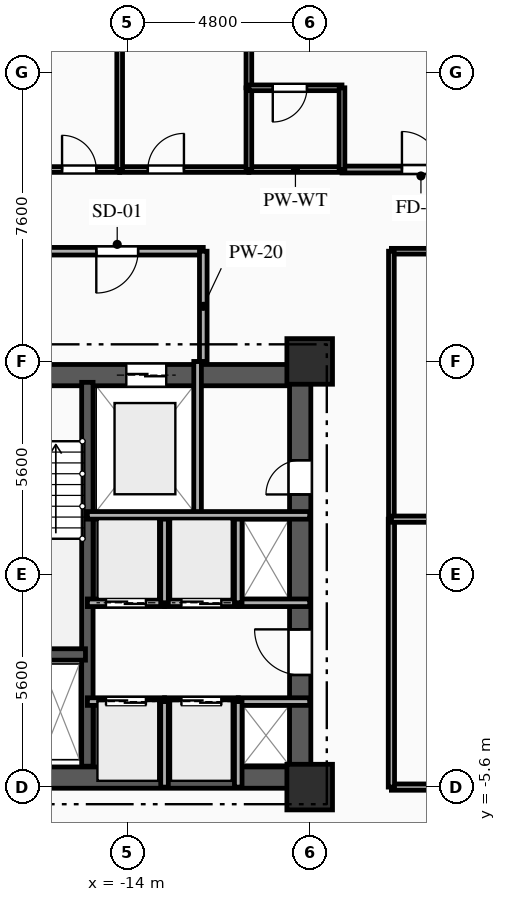
"""IFC4 building model, lengths in metres.
Left out: names, types, materials, properties, quantities, classifications, styles, units other than length and angle.
Written with IfcOpenShell. Run it as: python <this file> out.ifc"""

import sys

from ifc_helpers import new_model, si_unit, direction, frame, frame_2d, origin, origin_2d, place, context, subcontext, project, spatial, rectangle, extrude, element, fill, save


model = new_model("IFC4")
c1 = context("Model", 3, precision=1e-05, world=origin(), true_north=direction((0.0, 1.0)))
c2 = subcontext(c1, "Body", "Model", "MODEL_VIEW")
j1 = project(units=[si_unit("LENGTHUNIT", "METRE"), si_unit("PLANEANGLEUNIT", "RADIAN")], contexts=[c1])
p1 = place(None, origin())
s1 = spatial("IfcSite", under=j1, at=p1, CompositionType="ELEMENT")
p2 = place(p1, origin())
s2 = spatial("IfcBuilding", under=s1, at=p2, CompositionType="ELEMENT")
p3 = place(p2, frame((0.0, 0.0, 53.8)))
s3 = spatial("IfcBuildingStorey", under=s2, at=p3, CompositionType="ELEMENT", Elevation=53.8)
for number, where, z_axis, x_axis in (
    (1, (-9.2, -5.6, 0.0), (0.0, 0.0, 1.0), (1.0, 0.0, 0.0)),
    (2, (-9.2, 5.6, 0.0), (0.0, 0.0, 1.0), (1.0, 0.0, 0.0)),
):
    element("IfcColumn", number, at=place(p3, frame(where, z_axis=z_axis, x_axis=x_axis)), inside=s3, PredefinedType="COLUMN", context=c2, shape_type="SweptSolid", body=[
        extrude(rectangle(XDim=1.2, YDim=1.2, at=origin_2d()), origin(), (0.0, 0.0, 1.0), 3.35),
    ])
p4 = place(p3, frame((-18.8, 5.24, 0.0), z_axis=(0.0, 0.0, 1.0), x_axis=(1.0, 0.0, 0.0)))
e3 = element("IfcWall", 3, at=p4, inside=s3, PredefinedType="SHEAR", context=c2, shape_type="SweptSolid", body=[
    extrude(rectangle(XDim=9.6, YDim=0.56, at=frame_2d((4.8, 0.0))), origin(), (0.0, 0.0, 1.0), 3.035),
])
p5 = place(p4, frame((1.55, 0.0, 0.0)))
e4 = element("IfcOpeningElement", 4, at=p5, cuts=e3, PredefinedType="OPENING", context=c2, shape_type="SweptSolid", body=[
    extrude(rectangle(XDim=1.1, YDim=2.15, at=frame_2d((0.55, 1.075))), frame((0.0, 0.29, 0.0), z_axis=(0.0, -1.0, 0.0), x_axis=(1.0, 0.0, 0.0)), (0.0, 0.0, 1.0), 0.58),
])
p6 = place(p4, frame((4.775, 0.0, 0.0)))
e5 = element("IfcOpeningElement", 5, at=p6, cuts=e3, PredefinedType="OPENING", context=c2, shape_type="SweptSolid", body=[
    extrude(rectangle(XDim=1.05, YDim=2.1, at=frame_2d((0.525, 1.05))), frame((0.0, 0.29, 0.0), z_axis=(0.0, -1.0, 0.0), x_axis=(1.0, 0.0, 0.0)), (0.0, 0.0, 1.0), 0.58),
])
p7 = place(p3, frame((-18.8, -5.35, 0.0), z_axis=(0.0, 0.0, 1.0), x_axis=(1.0, 0.0, 0.0)))
e6 = element("IfcWall", 6, at=p7, inside=s3, PredefinedType="SHEAR", context=c2, shape_type="SweptSolid", body=[
    extrude(rectangle(XDim=9.6, YDim=0.56, at=frame_2d((4.8, 0.0))), origin(), (0.0, 0.0, 1.0), 3.035),
])
p8 = place(p7, frame((1.05, 0.0, 0.0)))
e7 = element("IfcOpeningElement", 7, at=p8, cuts=e6, PredefinedType="OPENING", context=c2, shape_type="SweptSolid", body=[
    extrude(rectangle(XDim=0.9, YDim=2.1, at=frame_2d((0.45, 1.05))), frame((0.0, 0.29, 0.0), z_axis=(0.0, -1.0, 0.0), x_axis=(1.0, 0.0, 0.0)), (0.0, 0.0, 1.0), 0.58),
])
p9 = place(p3, frame((-9.45, -5.05, 0.0), z_axis=(0.0, 0.0, 1.0), x_axis=(0.0, 1.0, 0.0)))
e8 = element("IfcWall", 8, at=p9, inside=s3, PredefinedType="SHEAR", context=c2, shape_type="SweptSolid", body=[
    extrude(rectangle(XDim=10.1, YDim=0.56, at=frame_2d((5.05, 0.0))), origin(), (0.0, 0.0, 1.0), 3.035),
])
p10 = place(p9, frame((7.15, 0.0, 0.0)))
e9 = element("IfcOpeningElement", 9, at=p10, cuts=e8, PredefinedType="OPENING", context=c2, shape_type="SweptSolid", body=[
    extrude(rectangle(XDim=0.9, YDim=2.1, at=frame_2d((0.45, 1.05))), frame((0.0, 0.29, 0.0), z_axis=(0.0, -1.0, 0.0), x_axis=(1.0, 0.0, 0.0)), (0.0, 0.0, 1.0), 0.58),
])
p11 = place(p9, frame((2.4, 0.0, 0.0)))
e10 = element("IfcOpeningElement", 10, at=p11, cuts=e8, PredefinedType="OPENING", context=c2, shape_type="SweptSolid", body=[
    extrude(rectangle(XDim=1.2, YDim=2.15, at=frame_2d((0.6, 1.075))), frame((0.0, 0.29, 0.0), z_axis=(0.0, -1.0, 0.0), x_axis=(1.0, 0.0, 0.0)), (0.0, 0.0, 1.0), 0.58),
])
p12 = place(p3, frame((-15.05, -5.05, 0.0), z_axis=(0.0, 0.0, 1.0), x_axis=(0.0, 1.0, 0.0)))
e11 = element("IfcWall", 11, at=p12, inside=s3, PredefinedType="SHEAR", context=c2, shape_type="SweptSolid", body=[
    extrude(rectangle(XDim=10.1, YDim=0.3, at=frame_2d((5.05, 0.0))), origin(), (0.0, 0.0, 1.0), 3.035),
])
p13 = place(p3, frame((-18.28, -2.11, 0.0), z_axis=(0.0, 0.0, 1.0), x_axis=(1.0, 0.0, 0.0)))
e12 = element("IfcWall", 12, at=p13, inside=s3, PredefinedType="SHEAR", context=c2, shape_type="SweptSolid", body=[
    extrude(rectangle(XDim=3.18, YDim=0.3, at=frame_2d((1.59, 0.0))), origin(), (0.0, 0.0, 1.0), 3.035),
])
p14 = place(p3, frame((-12.15, 1.55, 0.0), z_axis=(0.0, 0.0, 1.0), x_axis=(0.0, 1.0, 0.0)))
e13 = element("IfcWall", 13, at=p14, inside=s3, PredefinedType="PARTITIONING", context=c2, shape_type="SweptSolid", body=[
    extrude(rectangle(XDim=4.05, YDim=0.2, at=frame_2d((2.025, 0.0))), origin(), (0.0, 0.0, 1.0), 3.035),
])
p15 = place(p3, frame((-12.0, 8.5, 0.0), z_axis=(0.0, 0.0, 1.0), x_axis=(-1.0, 0.0, 0.0)))
e14 = element("IfcWall", 14, at=p15, inside=s3, PredefinedType="PARTITIONING", context=c2, shape_type="SweptSolid", body=[
    extrude(rectangle(XDim=6.8, YDim=0.2, at=frame_2d((3.4, 0.0))), origin(), (0.0, 0.0, 1.0), 3.035),
])
p16 = place(p15, frame((1.715, 0.0, 0.0)))
e15 = element("IfcOpeningElement", 15, at=p16, cuts=e14, PredefinedType="OPENING", context=c2, shape_type="SweptSolid", body=[
    extrude(rectangle(XDim=1.1, YDim=2.15, at=frame_2d((0.55, 1.075))), frame((0.0, 0.11, 0.0), z_axis=(0.0, -1.0, 0.0), x_axis=(1.0, 0.0, 0.0)), (0.0, 0.0, 1.0), 0.22),
])
p17 = place(p3, frame((-12.0, 5.6, 0.0), z_axis=(0.0, 0.0, 1.0), x_axis=(0.0, 1.0, 0.0)))
e16 = element("IfcWall", 16, at=p17, inside=s3, PredefinedType="PARTITIONING", context=c2, shape_type="SweptSolid", body=[
    extrude(rectangle(XDim=2.9, YDim=0.2, at=frame_2d((1.45, 0.0))), origin(), (0.0, 0.0, 1.0), 3.035),
])
p18 = place(p3, frame((-15.05, -3.35, 0.0), z_axis=(0.0, 0.0, 1.0), x_axis=(1.0, 0.0, 0.0)))
e17 = element("IfcWall", 17, at=p18, inside=s3, PredefinedType="PARTITIONING", context=c2, shape_type="SweptSolid", body=[
    extrude(rectangle(XDim=2.03, YDim=0.2, at=frame_2d((1.015, 0.0))), origin(), (0.0, 0.0, 1.0), 3.035),
])
p19 = place(p18, frame((0.49, 0.0, 0.0)))
e18 = element("IfcOpeningElement", 18, at=p19, cuts=e17, PredefinedType="OPENING", context=c2, shape_type="SweptSolid", body=[
    extrude(rectangle(XDim=1.05, YDim=2.1, at=frame_2d((0.525, 1.05))), frame((0.0, 0.11, 0.0), z_axis=(0.0, -1.0, 0.0), x_axis=(1.0, 0.0, 0.0)), (0.0, 0.0, 1.0), 0.22),
])
p20 = place(p3, frame((-13.02, -3.35, 0.0), z_axis=(0.0, 0.0, 1.0), x_axis=(1.0, 0.0, 0.0)))
e19 = element("IfcWall", 19, at=p20, inside=s3, PredefinedType="PARTITIONING", context=c2, shape_type="SweptSolid", body=[
    extrude(rectangle(XDim=1.94, YDim=0.2, at=frame_2d((0.97, 0.0))), origin(), (0.0, 0.0, 1.0), 3.035),
])
p21 = place(p20, frame((0.445, 0.0, 0.0)))
e20 = element("IfcOpeningElement", 20, at=p21, cuts=e19, PredefinedType="OPENING", context=c2, shape_type="SweptSolid", body=[
    extrude(rectangle(XDim=1.05, YDim=2.1, at=frame_2d((0.525, 1.05))), frame((0.0, 0.11, 0.0), z_axis=(0.0, -1.0, 0.0), x_axis=(1.0, 0.0, 0.0)), (0.0, 0.0, 1.0), 0.22),
])
p22 = place(p3, frame((-11.08, -3.35, 0.0), z_axis=(0.0, 0.0, 1.0), x_axis=(1.0, 0.0, 0.0)))
e21 = element("IfcWall", 21, at=p22, inside=s3, PredefinedType="PARTITIONING", context=c2, shape_type="SweptSolid", body=[
    extrude(rectangle(XDim=1.88, YDim=0.2, at=frame_2d((0.94, 0.0))), origin(), (0.0, 0.0, 1.0), 2.75),
])
p23 = place(p3, frame((-13.02, -0.75, 0.0), z_axis=(0.0, 0.0, 1.0), x_axis=(-1.0, 0.0, 0.0)))
e22 = element("IfcWall", 22, at=p23, inside=s3, PredefinedType="PARTITIONING", context=c2, shape_type="SweptSolid", body=[
    extrude(rectangle(XDim=2.03, YDim=0.2, at=frame_2d((1.015, 0.0))), origin(), (0.0, 0.0, 1.0), 3.035),
])
p24 = place(p23, frame((0.49, 0.0, 0.0)))
e23 = element("IfcOpeningElement", 23, at=p24, cuts=e22, PredefinedType="OPENING", context=c2, shape_type="SweptSolid", body=[
    extrude(rectangle(XDim=1.05, YDim=2.1, at=frame_2d((0.525, 1.05))), frame((0.0, 0.11, 0.0), z_axis=(0.0, -1.0, 0.0), x_axis=(1.0, 0.0, 0.0)), (0.0, 0.0, 1.0), 0.22),
])
p25 = place(p3, frame((-11.08, -0.75, 0.0), z_axis=(0.0, 0.0, 1.0), x_axis=(-1.0, 0.0, 0.0)))
e24 = element("IfcWall", 24, at=p25, inside=s3, PredefinedType="PARTITIONING", context=c2, shape_type="SweptSolid", body=[
    extrude(rectangle(XDim=1.94, YDim=0.2, at=frame_2d((0.97, 0.0))), origin(), (0.0, 0.0, 1.0), 3.035),
])
p26 = place(p25, frame((0.445, 0.0, 0.0)))
e25 = element("IfcOpeningElement", 25, at=p26, cuts=e24, PredefinedType="OPENING", context=c2, shape_type="SweptSolid", body=[
    extrude(rectangle(XDim=1.05, YDim=2.1, at=frame_2d((0.525, 1.05))), frame((0.0, 0.11, 0.0), z_axis=(0.0, -1.0, 0.0), x_axis=(1.0, 0.0, 0.0)), (0.0, 0.0, 1.0), 0.22),
])
p27 = place(p3, frame((-9.2, -0.75, 0.0), z_axis=(0.0, 0.0, 1.0), x_axis=(-1.0, 0.0, 0.0)))
e26 = element("IfcWall", 26, at=p27, inside=s3, PredefinedType="PARTITIONING", context=c2, shape_type="SweptSolid", body=[
    extrude(rectangle(XDim=1.88, YDim=0.2, at=frame_2d((0.94, 0.0))), origin(), (0.0, 0.0, 1.0), 3.035),
])
for number, where, z_axis, x_axis in (
    (27, (-13.02, -5.6, 0.0), (0.0, 0.0, 1.0), (0.0, 1.0, 0.0)),
    (28, (-11.08, -5.6, 0.0), (0.0, 0.0, 1.0), (0.0, 1.0, 0.0)),
):
    element("IfcWall", number, at=place(p3, frame(where, z_axis=z_axis, x_axis=x_axis)), inside=s3, PredefinedType="PARTITIONING", context=c2, shape_type="SweptSolid", body=[
        extrude(rectangle(XDim=2.25, YDim=0.2, at=frame_2d((1.125, 0.0))), origin(), (0.0, 0.0, 1.0), 3.035),
    ])
for number, where, z_axis, x_axis in (
    (29, (-13.02, -0.75, 0.0), (0.0, 0.0, 1.0), (0.0, 1.0, 0.0)),
    (30, (-11.08, -0.75, 0.0), (0.0, 0.0, 1.0), (0.0, 1.0, 0.0)),
):
    element("IfcWall", number, at=place(p3, frame(where, z_axis=z_axis, x_axis=x_axis)), inside=s3, PredefinedType="PARTITIONING", context=c2, shape_type="SweptSolid", body=[
        extrude(rectangle(XDim=2.3, YDim=0.2, at=frame_2d((1.15, 0.0))), origin(), (0.0, 0.0, 1.0), 3.035),
    ])
p28 = place(p3, frame((-16.55, 10.65, 0.0), z_axis=(0.0, 0.0, 1.0), x_axis=(1.0, 0.0, 0.0)))
e31 = element("IfcWall", 31, at=p28, inside=s3, PredefinedType="PLUMBINGWALL", context=c2, shape_type="SweptSolid", body=[
    extrude(rectangle(XDim=2.35, YDim=0.15, at=frame_2d((1.175, 0.0))), origin(), (0.0, 0.0, 1.0), 3.035),
])
p29 = place(p28, frame((0.834, 0.0, 0.0)))
e32 = element("IfcOpeningElement", 32, at=p29, cuts=e31, PredefinedType="OPENING", context=c2, shape_type="SweptSolid", body=[
    extrude(rectangle(XDim=0.9, YDim=2.1, at=frame_2d((0.45, 1.05))), frame((0.0, 0.085, 0.0), z_axis=(0.0, -1.0, 0.0), x_axis=(1.0, 0.0, 0.0)), (0.0, 0.0, 1.0), 0.17),
])
p30 = place(p3, frame((-14.2, 10.65, 0.0), z_axis=(0.0, 0.0, 1.0), x_axis=(1.0, 0.0, 0.0)))
e33 = element("IfcWall", 33, at=p30, inside=s3, PredefinedType="PARTITIONING", context=c2, shape_type="SweptSolid", body=[
    extrude(rectangle(XDim=3.4, YDim=0.15, at=frame_2d((1.7, 0.0))), origin(), (0.0, 0.0, 1.0), 3.035),
])
p31 = place(p30, frame((0.741, 0.0, 0.0)))
e34 = element("IfcOpeningElement", 34, at=p31, cuts=e33, PredefinedType="OPENING", context=c2, shape_type="SweptSolid", body=[
    extrude(rectangle(XDim=0.95, YDim=2.1, at=frame_2d((0.475, 1.05))), frame((0.0, 0.085, 0.0), z_axis=(0.0, -1.0, 0.0), x_axis=(1.0, 0.0, 0.0)), (0.0, 0.0, 1.0), 0.17),
])
p32 = place(p3, frame((-8.35, 10.65, 0.0), z_axis=(0.0, 0.0, 1.0), x_axis=(1.0, 0.0, 0.0)))
e35 = element("IfcWall", 35, at=p32, inside=s3, PredefinedType="PARTITIONING", context=c2, shape_type="SweptSolid", body=[
    extrude(rectangle(XDim=3.3, YDim=0.18, at=frame_2d((1.65, 0.0))), origin(), (0.0, 0.0, 1.0), 3.035),
])
p33 = place(p32, frame((1.577, 0.0, 0.0)))
e36 = element("IfcOpeningElement", 36, at=p33, cuts=e35, PredefinedType="OPENING", context=c2, shape_type="SweptSolid", body=[
    extrude(rectangle(XDim=1.0, YDim=2.15, at=frame_2d((0.5, 1.075))), frame((0.0, 0.1, 0.0), z_axis=(0.0, -1.0, 0.0), x_axis=(1.0, 0.0, 0.0)), (0.0, 0.0, 1.0), 0.2),
])
p34 = place(p3, frame((-10.8, 10.65, 0.0), z_axis=(0.0, 0.0, 1.0), x_axis=(1.0, 0.0, 0.0)))
e37 = element("IfcWall", 37, at=p34, inside=s3, PredefinedType="PLUMBINGWALL", context=c2, shape_type="SweptSolid", body=[
    extrude(rectangle(XDim=2.45, YDim=0.15, at=frame_2d((1.225, 0.0))), origin(), (0.0, 0.0, 1.0), 3.035),
])
p35 = place(p3, frame((0.0, 8.5, 0.0), z_axis=(0.0, 0.0, 1.0), x_axis=(-1.0, 0.0, 0.0)))
e38 = element("IfcWall", 38, at=p35, inside=s3, PredefinedType="PARTITIONING", context=c2, shape_type="SweptSolid", body=[
    extrude(rectangle(XDim=7.05, YDim=0.15, at=frame_2d((3.525, 0.0))), origin(), (0.0, 0.0, 1.0), 3.035),
])
p36 = place(p35, frame((1.185, 0.0, 0.0)))
e39 = element("IfcOpeningElement", 39, at=p36, cuts=e38, PredefinedType="OPENING", context=c2, shape_type="SweptSolid", body=[
    extrude(rectangle(XDim=1.05, YDim=2.15, at=frame_2d((0.525, 1.075))), frame((0.0, 0.085, 0.0), z_axis=(0.0, -1.0, 0.0), x_axis=(1.0, 0.0, 0.0)), (0.0, 0.0, 1.0), 0.17),
])
p37 = place(p3, frame((-7.05, -5.6, 0.0), z_axis=(0.0, 0.0, 1.0), x_axis=(1.0, 0.0, 0.0)))
e40 = element("IfcWall", 40, at=p37, inside=s3, PredefinedType="PARTITIONING", context=c2, shape_type="SweptSolid", body=[
    extrude(rectangle(XDim=7.05, YDim=0.165, at=frame_2d((3.525, 0.0))), origin(), (0.0, 0.0, 1.0), 2.52),
])
p38 = place(p37, frame((4.728, 0.0, 0.0)))
e41 = element("IfcOpeningElement", 41, at=p38, cuts=e40, PredefinedType="OPENING", context=c2, shape_type="SweptSolid", body=[
    extrude(rectangle(XDim=1.15, YDim=2.15, at=frame_2d((0.575, 1.075))), frame((0.0, 0.093, 0.0), z_axis=(0.0, -1.0, 0.0), x_axis=(1.0, 0.0, 0.0)), (0.0, 0.0, 1.0), 0.185),
])
p39 = place(p3, frame((-7.05, 1.45, 0.0), z_axis=(0.0, 0.0, 1.0), x_axis=(0.0, -1.0, 0.0)))
e42 = element("IfcWall", 42, at=p39, inside=s3, PredefinedType="PARTITIONING", context=c2, shape_type="SweptSolid", body=[
    extrude(rectangle(XDim=7.05, YDim=0.165, at=frame_2d((3.525, 0.0))), origin(), (0.0, 0.0, 1.0), 3.035),
])
p40 = place(p3, frame((-7.05, 8.5, 0.0), z_axis=(0.0, 0.0, 1.0), x_axis=(0.0, -1.0, 0.0)))
e43 = element("IfcWall", 43, at=p40, inside=s3, PredefinedType="PARTITIONING", context=c2, shape_type="SweptSolid", body=[
    extrude(rectangle(XDim=7.05, YDim=0.15, at=frame_2d((3.525, 0.0))), origin(), (0.0, 0.0, 1.0), 3.035),
])
p41 = place(p3, frame((-14.2, 19.4, 0.0), z_axis=(0.0, 0.0, 1.0), x_axis=(0.0, -1.0, 0.0)))
e44 = element("IfcWall", 44, at=p41, inside=s3, PredefinedType="PLUMBINGWALL", context=c2, shape_type="SweptSolid", body=[
    extrude(rectangle(XDim=8.75, YDim=0.15, at=frame_2d((4.375, 0.0))), origin(), (0.0, 0.0, 1.0), 3.035),
])
p42 = place(p3, frame((-10.8, 19.4, 0.0), z_axis=(0.0, 0.0, 1.0), x_axis=(0.0, -1.0, 0.0)))
e45 = element("IfcWall", 45, at=p42, inside=s3, PredefinedType="PARTITIONING", context=c2, shape_type="SweptSolid", body=[
    extrude(rectangle(XDim=6.6, YDim=0.15, at=frame_2d((3.3, 0.0))), origin(), (0.0, 0.0, 1.0), 3.035),
])
p43 = place(p3, frame((-10.8, 12.8, 0.0), z_axis=(0.0, 0.0, 1.0), x_axis=(0.0, -1.0, 0.0)))
e46 = element("IfcWall", 46, at=p43, inside=s3, PredefinedType="PLUMBINGWALL", context=c2, shape_type="SweptSolid", body=[
    extrude(rectangle(XDim=2.15, YDim=0.15, at=frame_2d((1.075, 0.0))), origin(), (0.0, 0.0, 1.0), 3.035),
])
p44 = place(p3, frame((-8.35, 12.8, 0.0), z_axis=(0.0, 0.0, 1.0), x_axis=(-1.0, 0.0, 0.0)))
e47 = element("IfcWall", 47, at=p44, inside=s3, PredefinedType="PLUMBINGWALL", context=c2, shape_type="SweptSolid", body=[
    extrude(rectangle(XDim=2.45, YDim=0.15, at=frame_2d((1.225, 0.0))), origin(), (0.0, 0.0, 1.0), 3.035),
])
p45 = place(p44, frame((0.921, 0.0, 0.0)))
e48 = element("IfcOpeningElement", 48, at=p45, cuts=e47, PredefinedType="OPENING", context=c2, shape_type="SweptSolid", body=[
    extrude(rectangle(XDim=0.9, YDim=2.1, at=frame_2d((0.45, 1.05))), frame((0.0, 0.085, 0.0), z_axis=(0.0, -1.0, 0.0), x_axis=(1.0, 0.0, 0.0)), (0.0, 0.0, 1.0), 0.17),
])
p46 = place(p3, frame((-8.35, 10.65, 0.0), z_axis=(0.0, 0.0, 1.0), x_axis=(0.0, 1.0, 0.0)))
e49 = element("IfcWall", 49, at=p46, inside=s3, PredefinedType="PLUMBINGWALL", context=c2, shape_type="SweptSolid", body=[
    extrude(rectangle(XDim=2.15, YDim=0.15, at=frame_2d((1.075, 0.0))), origin(), (0.0, 0.0, 1.0), 3.035),
])
p47 = place(p3, frame((-7.05, 1.45, 0.0), z_axis=(0.0, 0.0, 1.0), x_axis=(1.0, 0.0, 0.0)))
e50 = element("IfcWall", 50, at=p47, inside=s3, PredefinedType="PARTITIONING", context=c2, shape_type="SweptSolid", body=[
    extrude(rectangle(XDim=14.1, YDim=0.165, at=frame_2d((7.05, 0.0))), origin(), (0.0, 0.0, 1.0), 3.035),
])
p48 = place(p3, frame((-15.05, 1.55, 0.0), z_axis=(0.0, 0.0, 1.0), x_axis=(1.0, 0.0, 0.0)))
e51 = element("IfcWall", 51, at=p48, inside=s3, PredefinedType="PARTITIONING", context=c2, shape_type="SweptSolid", body=[
    extrude(rectangle(XDim=5.85, YDim=0.2, at=frame_2d((2.925, 0.0))), origin(), (0.0, 0.0, 1.0), 3.035),
])
p49 = place(p6, origin())
e52 = element("IfcDoor", 52, at=p49, inside=s3, OperationType="DOUBLE_DOOR_SLIDING", PredefinedType="DOOR", context=c2, shape_type="SweptSolid", body=[
    extrude(rectangle(XDim=1.05, YDim=2.1, at=frame_2d((0.525, 1.05))), frame((0.0, 0.025, 0.0), z_axis=(0.0, -1.0, 0.0), x_axis=(1.0, 0.0, 0.0)), (0.0, 0.0, 1.0), 0.05),
])
fill(e5, e52)
p50 = place(p16, origin())
e53 = element("IfcDoor", 53, at=p50, inside=s3, OperationType="SINGLE_SWING_RIGHT", PredefinedType="DOOR", context=c2, shape_type="SweptSolid", body=[
    extrude(rectangle(XDim=1.1, YDim=2.15, at=frame_2d((0.55, 1.075))), frame((0.0, 0.025, 0.0), z_axis=(0.0, -1.0, 0.0), x_axis=(1.0, 0.0, 0.0)), (0.0, 0.0, 1.0), 0.05),
])
fill(e15, e53)
p51 = place(p10, origin())
e54 = element("IfcDoor", 54, at=p51, inside=s3, OperationType="SINGLE_SWING_LEFT", PredefinedType="DOOR", context=c2, shape_type="SweptSolid", body=[
    extrude(rectangle(XDim=0.9, YDim=2.1, at=frame_2d((0.45, 1.05))), frame((0.0, 0.025, 0.0), z_axis=(0.0, -1.0, 0.0), x_axis=(1.0, 0.0, 0.0)), (0.0, 0.0, 1.0), 0.05),
])
fill(e9, e54)
p52 = place(p19, origin())
e55 = element("IfcDoor", 55, at=p52, inside=s3, OperationType="DOUBLE_DOOR_SLIDING", PredefinedType="DOOR", context=c2, shape_type="SweptSolid", body=[
    extrude(rectangle(XDim=1.05, YDim=2.1, at=frame_2d((0.525, 1.05))), frame((0.0, 0.025, 0.0), z_axis=(0.0, -1.0, 0.0), x_axis=(1.0, 0.0, 0.0)), (0.0, 0.0, 1.0), 0.05),
])
fill(e18, e55)
p53 = place(p21, origin())
e56 = element("IfcDoor", 56, at=p53, inside=s3, OperationType="DOUBLE_DOOR_SLIDING", PredefinedType="DOOR", context=c2, shape_type="SweptSolid", body=[
    extrude(rectangle(XDim=1.05, YDim=2.1, at=frame_2d((0.525, 1.05))), frame((0.0, 0.025, 0.0), z_axis=(0.0, -1.0, 0.0), x_axis=(1.0, 0.0, 0.0)), (0.0, 0.0, 1.0), 0.05),
])
fill(e20, e56)
p54 = place(p24, origin())
e57 = element("IfcDoor", 57, at=p54, inside=s3, OperationType="DOUBLE_DOOR_SLIDING", PredefinedType="DOOR", context=c2, shape_type="SweptSolid", body=[
    extrude(rectangle(XDim=1.05, YDim=2.1, at=frame_2d((0.525, 1.05))), frame((0.0, 0.025, 0.0), z_axis=(0.0, -1.0, 0.0), x_axis=(1.0, 0.0, 0.0)), (0.0, 0.0, 1.0), 0.05),
])
fill(e23, e57)
p55 = place(p26, origin())
e58 = element("IfcDoor", 58, at=p55, inside=s3, OperationType="DOUBLE_DOOR_SLIDING", PredefinedType="DOOR", context=c2, shape_type="SweptSolid", body=[
    extrude(rectangle(XDim=1.05, YDim=2.1, at=frame_2d((0.525, 1.05))), frame((0.0, 0.025, 0.0), z_axis=(0.0, -1.0, 0.0), x_axis=(1.0, 0.0, 0.0)), (0.0, 0.0, 1.0), 0.05),
])
fill(e25, e58)
p56 = place(p11, origin())
e59 = element("IfcDoor", 59, at=p56, inside=s3, OperationType="SINGLE_SWING_RIGHT", PredefinedType="DOOR", context=c2, shape_type="SweptSolid", body=[
    extrude(rectangle(XDim=1.2, YDim=2.15, at=frame_2d((0.6, 1.075))), frame((0.0, 0.025, 0.0), z_axis=(0.0, -1.0, 0.0), x_axis=(1.0, 0.0, 0.0)), (0.0, 0.0, 1.0), 0.05),
])
fill(e10, e59)
p57 = place(p29, origin())
e60 = element("IfcDoor", 60, at=p57, inside=s3, OperationType="SINGLE_SWING_LEFT", PredefinedType="DOOR", context=c2, shape_type="SweptSolid", body=[
    extrude(rectangle(XDim=0.9, YDim=2.1, at=frame_2d((0.45, 1.05))), frame((0.0, 0.025, 0.0), z_axis=(0.0, -1.0, 0.0), x_axis=(1.0, 0.0, 0.0)), (0.0, 0.0, 1.0), 0.05),
])
fill(e32, e60)
p58 = place(p31, origin())
e61 = element("IfcDoor", 61, at=p58, inside=s3, OperationType="SINGLE_SWING_RIGHT", PredefinedType="DOOR", context=c2, shape_type="SweptSolid", body=[
    extrude(rectangle(XDim=0.95, YDim=2.1, at=frame_2d((0.475, 1.05))), frame((0.0, 0.025, 0.0), z_axis=(0.0, -1.0, 0.0), x_axis=(1.0, 0.0, 0.0)), (0.0, 0.0, 1.0), 0.05),
])
fill(e34, e61)
p59 = place(p33, origin())
e62 = element("IfcDoor", 62, at=p59, inside=s3, OperationType="SINGLE_SWING_LEFT", PredefinedType="DOOR", context=c2, shape_type="SweptSolid", body=[
    extrude(rectangle(XDim=1.0, YDim=2.15, at=frame_2d((0.5, 1.075))), frame((0.0, 0.025, 0.0), z_axis=(0.0, -1.0, 0.0), x_axis=(1.0, 0.0, 0.0)), (0.0, 0.0, 1.0), 0.05),
])
fill(e36, e62)
p60 = place(p45, origin())
e63 = element("IfcDoor", 63, at=p60, inside=s3, OperationType="SINGLE_SWING_RIGHT", PredefinedType="DOOR", context=c2, shape_type="SweptSolid", body=[
    extrude(rectangle(XDim=0.9, YDim=2.1, at=frame_2d((0.45, 1.05))), frame((0.0, 0.025, 0.0), z_axis=(0.0, -1.0, 0.0), x_axis=(1.0, 0.0, 0.0)), (0.0, 0.0, 1.0), 0.05),
])
fill(e48, e63)
save(model, sys.argv[1])
